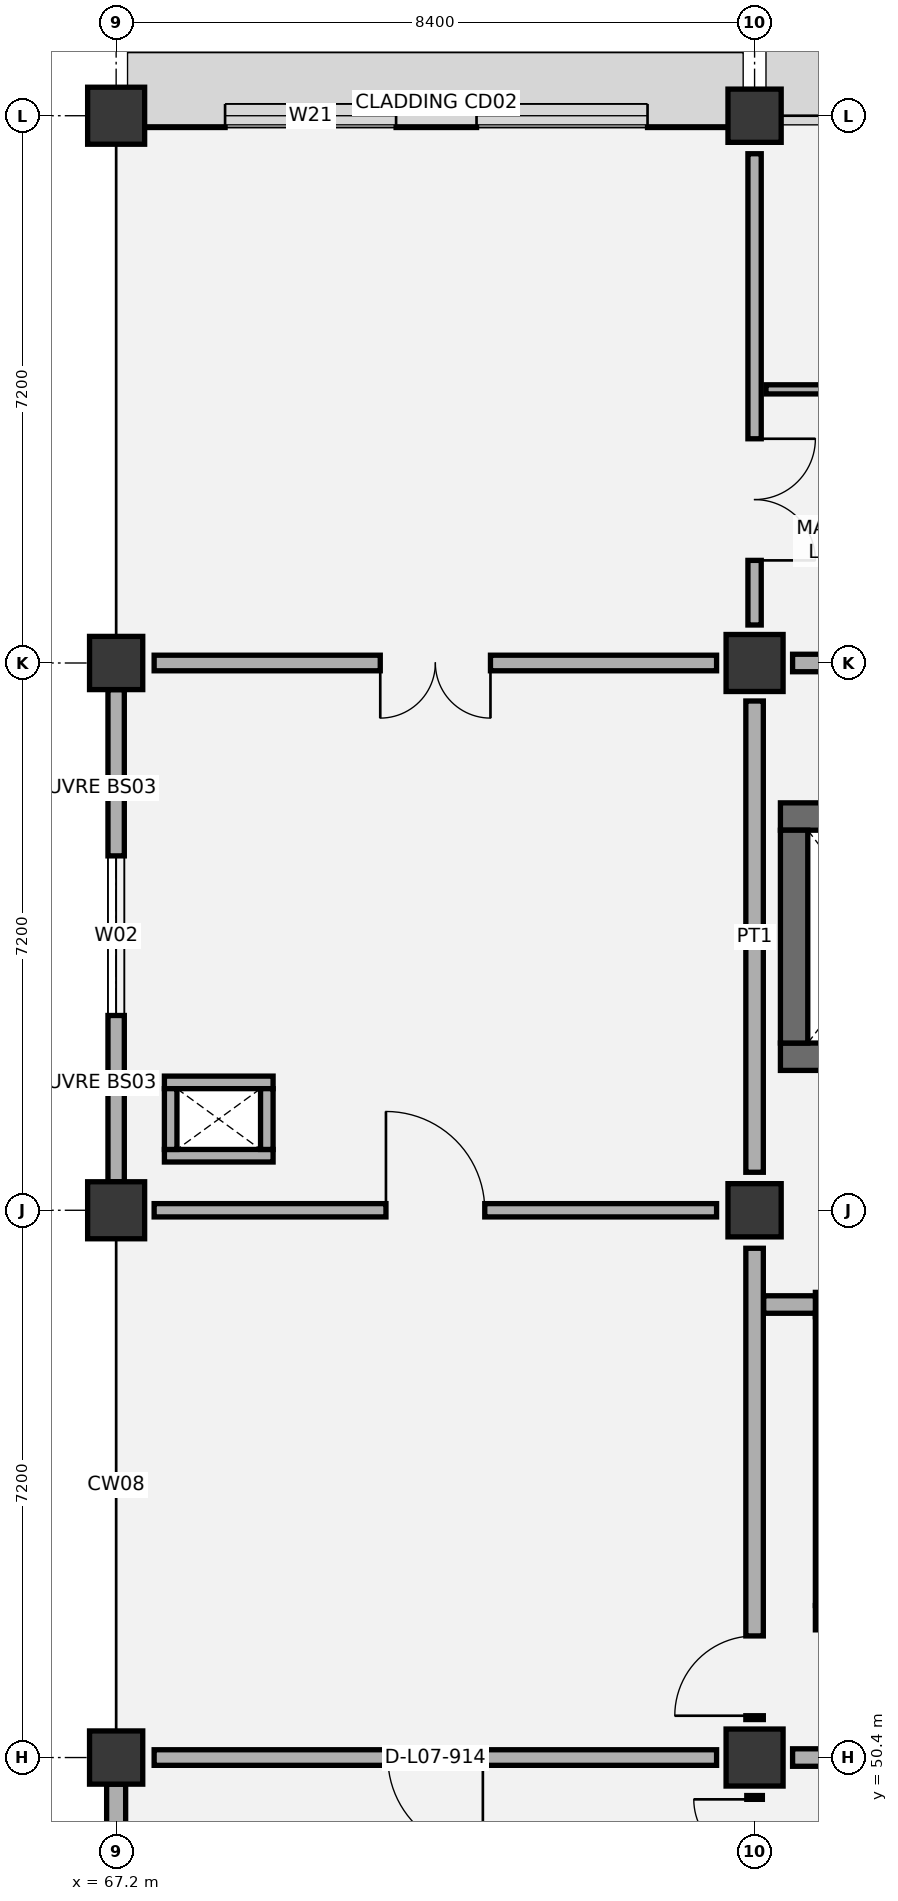
"""IFC4 building model, lengths in metres.
Left out: names, types, materials, properties, quantities, classifications, styles, units other than length and angle.
Written with IfcOpenShell. Run it as: python <this file> out.ifc"""

import sys

from ifc_helpers import new_model, si_unit, direction, frame, frame_2d, origin, origin_2d, place, context, subcontext, project, spatial, rectangle, extrude, element, fill, save


model = new_model("IFC4")
c1 = context("Model", 3, precision=1e-05, world=origin(), true_north=direction((0.0, 1.0)))
c2 = subcontext(c1, "Body", "Model", "MODEL_VIEW")
j1 = project(units=[si_unit("LENGTHUNIT", "METRE"), si_unit("PLANEANGLEUNIT", "RADIAN")], contexts=[c1])
p1 = place(None, origin())
s1 = spatial("IfcSite", under=j1, at=p1, CompositionType="ELEMENT")
p2 = place(p1, origin())
s2 = spatial("IfcBuilding", under=s1, at=p2, CompositionType="ELEMENT")
p3 = place(p2, frame((0.0, 0.0, 35.4)))
s3 = spatial("IfcBuildingStorey", under=s2, at=p3, CompositionType="ELEMENT", Elevation=35.4)
p4 = place(p3, frame((67.2, 50.4, 0.0), z_axis=(0.0, 0.0, 1.0), x_axis=(1.0, 0.0, 0.0)))
e1 = element("IfcColumn", 1, at=p4, inside=s3, PredefinedType="COLUMN", context=c2, shape_type="SweptSolid", body=[
    extrude(rectangle(XDim=0.7, YDim=0.7, at=origin_2d()), origin(), (0.0, 0.0, 1.0), 4.2),
])
p5 = place(p3, frame((67.2, 57.6, 0.0), z_axis=(0.0, 0.0, 1.0), x_axis=(1.0, 0.0, 0.0)))
e2 = element("IfcColumn", 2, at=p5, inside=s3, PredefinedType="COLUMN", context=c2, shape_type="SweptSolid", body=[
    extrude(rectangle(XDim=0.75, YDim=0.75, at=origin_2d()), origin(), (0.0, 0.0, 1.0), 4.2),
])
p6 = place(p3, frame((67.2, 64.8, 0.0), z_axis=(0.0, 0.0, 1.0), x_axis=(1.0, 0.0, 0.0)))
e3 = element("IfcColumn", 3, at=p6, inside=s3, PredefinedType="COLUMN", context=c2, shape_type="SweptSolid", body=[
    extrude(rectangle(XDim=0.7, YDim=0.7, at=origin_2d()), origin(), (0.0, 0.0, 1.0), 4.2),
])
for number, where, z_axis, x_axis in (
    (4, (67.2, 72.0, 0.0), (0.0, 0.0, 1.0), (1.0, 0.0, 0.0)),
    (5, (75.6, 50.4, 0.0), (0.0, 0.0, 1.0), (1.0, 0.0, 0.0)),
):
    element("IfcColumn", number, at=place(p3, frame(where, z_axis=z_axis, x_axis=x_axis)), inside=s3, PredefinedType="COLUMN", context=c2, shape_type="SweptSolid", body=[
        extrude(rectangle(XDim=0.75, YDim=0.75, at=origin_2d()), origin(), (0.0, 0.0, 1.0), 4.2),
    ])
p7 = place(p3, frame((75.6, 57.6, 0.0), z_axis=(0.0, 0.0, 1.0), x_axis=(1.0, 0.0, 0.0)))
e6 = element("IfcColumn", 6, at=p7, inside=s3, PredefinedType="COLUMN", context=c2, shape_type="SweptSolid", body=[
    extrude(rectangle(XDim=0.7, YDim=0.7, at=origin_2d()), origin(), (0.0, 0.0, 1.0), 4.2),
])
p8 = place(p3, frame((75.6, 64.8, 0.0), z_axis=(0.0, 0.0, 1.0), x_axis=(1.0, 0.0, 0.0)))
e7 = element("IfcColumn", 7, at=p8, inside=s3, PredefinedType="COLUMN", context=c2, shape_type="SweptSolid", body=[
    extrude(rectangle(XDim=0.75, YDim=0.75, at=origin_2d()), origin(), (0.0, 0.0, 1.0), 4.2),
])
p9 = place(p3, frame((75.6, 72.0, 0.0), z_axis=(0.0, 0.0, 1.0), x_axis=(1.0, 0.0, 0.0)))
e8 = element("IfcColumn", 8, at=p9, inside=s3, PredefinedType="COLUMN", context=c2, shape_type="SweptSolid", body=[
    extrude(rectangle(XDim=0.7, YDim=0.7, at=origin_2d()), origin(), (0.0, 0.0, 1.0), 4.2),
])
p10 = place(p3, frame((76.4, 52.24, 0.0), z_axis=(0.0, 0.0, 1.0), x_axis=(1.0, 0.0, 0.0)))
e9 = element("IfcWall", 9, at=p10, inside=s3, PredefinedType="SHEAR", context=c2, shape_type="SweptSolid", body=[
    extrude(rectangle(XDim=7.48, YDim=0.32, at=frame_2d((3.74, 0.0))), origin(), (0.0, 0.0, 1.0), 3.92),
])
p11 = place(p10, frame((0.45, 0.0, 0.0)))
e10 = element("IfcOpeningElement", 10, at=p11, cuts=e9, PredefinedType="OPENING", context=c2, shape_type="SweptSolid", body=[
    extrude(rectangle(XDim=1.05, YDim=2.15, at=frame_2d((0.525, 1.075))), frame((0.0, 0.17, 0.0), z_axis=(0.0, -1.0, 0.0), x_axis=(1.0, 0.0, 0.0)), (0.0, 0.0, 1.0), 0.34),
])
p12 = place(p3, frame((76.4, 56.36, 0.0), z_axis=(0.0, 0.0, 1.0), x_axis=(1.0, 0.0, 0.0)))
e11 = element("IfcWall", 11, at=p12, inside=s3, PredefinedType="SHEAR", context=c2, shape_type="SweptSolid", body=[
    extrude(rectangle(XDim=7.48, YDim=0.32, at=frame_2d((3.74, 0.0))), origin(), (0.0, 0.0, 1.0), 3.92),
])
p13 = place(p3, frame((76.56, 52.4, 0.0), z_axis=(0.0, 0.0, 1.0), x_axis=(0.0, 1.0, 0.0)))
e12 = element("IfcWall", 12, at=p13, inside=s3, PredefinedType="SHEAR", context=c2, shape_type="SweptSolid", body=[
    extrude(rectangle(XDim=3.8, YDim=0.32, at=frame_2d((1.9, 0.0))), origin(), (0.0, 0.0, 1.0), 3.92),
])
p14 = place(p3, frame((75.94, 62.78, 0.0), z_axis=(0.0, 0.0, 1.0), x_axis=(1.0, 0.0, 0.0)))
e13 = element("IfcWall", 13, at=p14, inside=s3, PredefinedType="SHEAR", context=c2, shape_type="SweptSolid", body=[
    extrude(rectangle(XDim=2.87, YDim=0.36, at=frame_2d((1.435, 0.0))), origin(), (0.0, 0.0, 1.0), 3.92),
])
p15 = place(p3, frame((75.94, 59.62, 0.0), z_axis=(0.0, 0.0, 1.0), x_axis=(1.0, 0.0, 0.0)))
e14 = element("IfcWall", 14, at=p15, inside=s3, PredefinedType="SHEAR", context=c2, shape_type="SweptSolid", body=[
    extrude(rectangle(XDim=2.87, YDim=0.36, at=frame_2d((1.435, 0.0))), origin(), (0.0, 0.0, 1.0), 3.92),
])
p16 = place(p15, frame((0.76, 0.0, 0.0)))
e15 = element("IfcOpeningElement", 15, at=p16, cuts=e14, PredefinedType="OPENING", context=c2, shape_type="SweptSolid", body=[
    extrude(rectangle(XDim=1.35, YDim=2.2, at=frame_2d((0.675, 1.1))), frame((0.0, 0.19, 0.0), z_axis=(0.0, -1.0, 0.0), x_axis=(1.0, 0.0, 0.0)), (0.0, 0.0, 1.0), 0.38),
])
p17 = place(p3, frame((76.12, 59.8, 0.0), z_axis=(0.0, 0.0, 1.0), x_axis=(0.0, 1.0, 0.0)))
e16 = element("IfcWall", 16, at=p17, inside=s3, PredefinedType="SHEAR", context=c2, shape_type="SweptSolid", body=[
    extrude(rectangle(XDim=2.8, YDim=0.36, at=frame_2d((1.4, 0.0))), origin(), (0.0, 0.0, 1.0), 3.92),
])
p18 = place(p3, frame((67.2, 43.575, 0.0), z_axis=(0.0, 0.0, 1.0), x_axis=(0.0, 1.0, 0.0)))
e17 = element("IfcWall", 17, at=p18, inside=s3, PredefinedType="SOLIDWALL", context=c2, shape_type="SweptSolid", body=[
    extrude(rectangle(XDim=6.475, YDim=0.25, at=frame_2d((3.238, 0.0))), origin(), (0.0, 0.0, 1.0), 3.365),
])
p19 = place(p18, frame((0.858, 0.0, 0.9)))
e18 = element("IfcOpeningElement", 18, at=p19, cuts=e17, PredefinedType="OPENING", context=c2, shape_type="SweptSolid", body=[
    extrude(rectangle(XDim=1.95, YDim=1.95, at=frame_2d((0.975, 0.975))), frame((0.0, 0.135, 0.0), z_axis=(0.0, -1.0, 0.0), x_axis=(1.0, 0.0, 0.0)), (0.0, 0.0, 1.0), 0.27),
])
p20 = place(p18, frame((3.667, 0.0, 0.9)))
e19 = element("IfcOpeningElement", 19, at=p20, cuts=e17, PredefinedType="OPENING", context=c2, shape_type="SweptSolid", body=[
    extrude(rectangle(XDim=1.95, YDim=1.95, at=frame_2d((0.975, 0.975))), frame((0.0, 0.135, 0.0), z_axis=(0.0, -1.0, 0.0), x_axis=(1.0, 0.0, 0.0)), (0.0, 0.0, 1.0), 0.27),
])
p21 = place(p3, frame((67.2, 57.975, 0.0), z_axis=(0.0, 0.0, 1.0), x_axis=(0.0, 1.0, 0.0)))
e20 = element("IfcWall", 20, at=p21, inside=s3, PredefinedType="SOLIDWALL", context=c2, shape_type="SweptSolid", body=[
    extrude(rectangle(XDim=6.475, YDim=0.215, at=frame_2d((3.237, 0.0))), origin(), (0.0, 0.0, 1.0), 3.365),
])
p22 = place(p21, frame((2.188, 0.0, 0.9)))
e21 = element("IfcOpeningElement", 21, at=p22, cuts=e20, PredefinedType="OPENING", context=c2, shape_type="SweptSolid", body=[
    extrude(rectangle(XDim=2.1, YDim=1.8, at=frame_2d((1.05, 0.9))), frame((0.0, 0.117, 0.0), z_axis=(0.0, -1.0, 0.0), x_axis=(1.0, 0.0, 0.0)), (0.0, 0.0, 1.0), 0.235),
])
p23 = place(p3, frame((67.575, 72.0, 0.0), z_axis=(0.0, 0.0, 1.0), x_axis=(1.0, 0.0, 0.0)))
e22 = element("IfcWall", 22, at=p23, inside=s3, PredefinedType="SOLIDWALL", context=c2, shape_type="SweptSolid", body=[
    extrude(rectangle(XDim=7.675, YDim=0.31, at=frame_2d((3.837, 0.0))), origin(), (0.0, 0.0, 1.0), 3.365),
])
p24 = place(p23, frame((1.058, 0.0, 0.9)))
e23 = element("IfcOpeningElement", 23, at=p24, cuts=e22, PredefinedType="OPENING", context=c2, shape_type="SweptSolid", body=[
    extrude(rectangle(XDim=2.25, YDim=1.95, at=frame_2d((1.125, 0.975))), frame((0.0, 0.165, 0.0), z_axis=(0.0, -1.0, 0.0), x_axis=(1.0, 0.0, 0.0)), (0.0, 0.0, 1.0), 0.33),
])
p25 = place(p23, frame((4.367, 0.0, 0.9)))
e24 = element("IfcOpeningElement", 24, at=p25, cuts=e22, PredefinedType="OPENING", context=c2, shape_type="SweptSolid", body=[
    extrude(rectangle(XDim=2.25, YDim=1.95, at=frame_2d((1.125, 0.975))), frame((0.0, 0.165, 0.0), z_axis=(0.0, -1.0, 0.0), x_axis=(1.0, 0.0, 0.0)), (0.0, 0.0, 1.0), 0.33),
])
for number, where, z_axis, x_axis in (
    (25, (67.835, 58.317, 0.0), (0.0, 0.0, 1.0), (1.0, 0.0, 0.0)),
    (26, (67.835, 59.282, 0.0), (0.0, 0.0, 1.0), (1.0, 0.0, 0.0)),
):
    element("IfcWall", number, at=place(p3, frame(where, z_axis=z_axis, x_axis=x_axis)), inside=s3, PredefinedType="PARTITIONING", context=c2, shape_type="SweptSolid", body=[
        extrude(rectangle(XDim=1.43, YDim=0.165, at=frame_2d((0.715, 0.0))), origin(), (0.0, 0.0, 1.0), 3.92),
    ])
for number, where, z_axis, x_axis in (
    (27, (67.917, 58.4, 0.0), (0.0, 0.0, 1.0), (0.0, 1.0, 0.0)),
    (28, (69.183, 58.4, 0.0), (0.0, 0.0, 1.0), (0.0, 1.0, 0.0)),
):
    element("IfcWall", number, at=place(p3, frame(where, z_axis=z_axis, x_axis=x_axis)), inside=s3, PredefinedType="PARTITIONING", context=c2, shape_type="SweptSolid", body=[
        extrude(rectangle(XDim=0.8, YDim=0.165, at=frame_2d((0.4, 0.0))), origin(), (0.0, 0.0, 1.0), 3.92),
    ])
p26 = place(p3, frame((75.75, 68.4, 0.0), z_axis=(0.0, 0.0, 1.0), x_axis=(1.0, 0.0, 0.0)))
e29 = element("IfcWall", 29, at=p26, inside=s3, PredefinedType="PARTITIONING", context=c2, shape_type="SweptSolid", body=[
    extrude(rectangle(XDim=8.1, YDim=0.12, at=frame_2d((4.05, 0.0))), origin(), (0.0, 0.0, 1.0), 3.92),
])
p27 = place(p26, frame((3.55, 0.0, 0.0)))
e30 = element("IfcOpeningElement", 30, at=p27, cuts=e29, PredefinedType="OPENING", context=c2, shape_type="SweptSolid", body=[
    extrude(rectangle(XDim=1.6, YDim=2.2, at=frame_2d((0.8, 1.1))), frame((0.0, 0.07, 0.0), z_axis=(0.0, -1.0, 0.0), x_axis=(1.0, 0.0, 0.0)), (0.0, 0.0, 1.0), 0.14),
])
p28 = place(p3, frame((75.6, 43.7, 0.0), z_axis=(0.0, 0.0, 1.0), x_axis=(0.0, 1.0, 0.0)))
e31 = element("IfcWall", 31, at=p28, inside=s3, PredefinedType="PARTITIONING", context=c2, shape_type="SweptSolid", body=[
    extrude(rectangle(XDim=6.2, YDim=0.205, at=frame_2d((3.1, 0.0))), origin(), (0.0, 0.0, 1.0), 3.415),
])
p29 = place(p28, frame((4.55, 0.0, 0.0)))
e32 = element("IfcOpeningElement", 32, at=p29, cuts=e31, PredefinedType="OPENING", context=c2, shape_type="SweptSolid", body=[
    extrude(rectangle(XDim=1.6, YDim=2.2, at=frame_2d((0.8, 1.1))), frame((0.0, 0.113, 0.0), z_axis=(0.0, -1.0, 0.0), x_axis=(1.0, 0.0, 0.0)), (0.0, 0.0, 1.0), 0.225),
])
p30 = place(p3, frame((67.7, 50.4, 0.0), z_axis=(0.0, 0.0, 1.0), x_axis=(1.0, 0.0, 0.0)))
e33 = element("IfcWall", 33, at=p30, inside=s3, PredefinedType="PARTITIONING", context=c2, shape_type="SweptSolid", body=[
    extrude(rectangle(XDim=7.4, YDim=0.205, at=frame_2d((3.7, 0.0))), origin(), (0.0, 0.0, 1.0), 3.265),
])
p31 = place(p30, frame((3.075, 0.0, 0.0)))
e34 = element("IfcOpeningElement", 34, at=p31, cuts=e33, PredefinedType="OPENING", context=c2, shape_type="SweptSolid", body=[
    extrude(rectangle(XDim=1.25, YDim=2.1, at=frame_2d((0.625, 1.05))), frame((0.0, 0.113, 0.0), z_axis=(0.0, -1.0, 0.0), x_axis=(1.0, 0.0, 0.0)), (0.0, 0.0, 1.0), 0.225),
])
p32 = place(p3, frame((75.6, 50.9, 0.0), z_axis=(0.0, 0.0, 1.0), x_axis=(0.0, 1.0, 0.0)))
e35 = element("IfcWall", 35, at=p32, inside=s3, PredefinedType="PARTITIONING", context=c2, shape_type="SweptSolid", body=[
    extrude(rectangle(XDim=6.2, YDim=0.23, at=frame_2d((3.1, 0.0))), origin(), (0.0, 0.0, 1.0), 3.315),
])
p33 = place(p32, frame((0.05, 0.0, 0.0)))
e36 = element("IfcOpeningElement", 36, at=p33, cuts=e35, PredefinedType="OPENING", context=c2, shape_type="SweptSolid", body=[
    extrude(rectangle(XDim=1.05, YDim=2.15, at=frame_2d((0.525, 1.075))), frame((0.0, 0.125, 0.0), z_axis=(0.0, -1.0, 0.0), x_axis=(1.0, 0.0, 0.0)), (0.0, 0.0, 1.0), 0.25),
])
p34 = place(p3, frame((67.7, 57.6, 0.0), z_axis=(0.0, 0.0, 1.0), x_axis=(1.0, 0.0, 0.0)))
e37 = element("IfcWall", 37, at=p34, inside=s3, PredefinedType="PARTITIONING", context=c2, shape_type="SweptSolid", body=[
    extrude(rectangle(XDim=7.4, YDim=0.175, at=frame_2d((3.7, 0.0))), origin(), (0.0, 0.0, 1.0), 3.265),
])
p35 = place(p34, frame((3.05, 0.0, 0.0)))
e38 = element("IfcOpeningElement", 38, at=p35, cuts=e37, PredefinedType="OPENING", context=c2, shape_type="SweptSolid", body=[
    extrude(rectangle(XDim=1.3, YDim=2.15, at=frame_2d((0.65, 1.075))), frame((0.0, 0.097, 0.0), z_axis=(0.0, -1.0, 0.0), x_axis=(1.0, 0.0, 0.0)), (0.0, 0.0, 1.0), 0.195),
])
p36 = place(p3, frame((75.6, 58.1, 0.0), z_axis=(0.0, 0.0, 1.0), x_axis=(0.0, 1.0, 0.0)))
e39 = element("IfcWall", 39, at=p36, inside=s3, PredefinedType="PARTITIONING", context=c2, shape_type="SweptSolid", body=[
    extrude(rectangle(XDim=6.2, YDim=0.23, at=frame_2d((3.1, 0.0))), origin(), (0.0, 0.0, 1.0), 3.515),
])
p37 = place(p3, frame((67.7, 64.8, 0.0), z_axis=(0.0, 0.0, 1.0), x_axis=(1.0, 0.0, 0.0)))
e40 = element("IfcWall", 40, at=p37, inside=s3, PredefinedType="PARTITIONING", context=c2, shape_type="SweptSolid", body=[
    extrude(rectangle(XDim=7.4, YDim=0.205, at=frame_2d((3.7, 0.0))), origin(), (0.0, 0.0, 1.0), 3.265),
])
p38 = place(p37, frame((2.975, 0.0, 0.0)))
e41 = element("IfcOpeningElement", 41, at=p38, cuts=e40, PredefinedType="OPENING", context=c2, shape_type="SweptSolid", body=[
    extrude(rectangle(XDim=1.45, YDim=2.2, at=frame_2d((0.725, 1.1))), frame((0.0, 0.113, 0.0), z_axis=(0.0, -1.0, 0.0), x_axis=(1.0, 0.0, 0.0)), (0.0, 0.0, 1.0), 0.225),
])
p39 = place(p3, frame((75.6, 65.3, 0.0), z_axis=(0.0, 0.0, 1.0), x_axis=(0.0, 1.0, 0.0)))
e42 = element("IfcWall", 42, at=p39, inside=s3, PredefinedType="PARTITIONING", context=c2, shape_type="SweptSolid", body=[
    extrude(rectangle(XDim=6.2, YDim=0.175, at=frame_2d((3.1, 0.0))), origin(), (0.0, 0.0, 1.0), 3.315),
])
p40 = place(p39, frame((0.85, 0.0, 0.0)))
e43 = element("IfcOpeningElement", 43, at=p40, cuts=e42, PredefinedType="OPENING", context=c2, shape_type="SweptSolid", body=[
    extrude(rectangle(XDim=1.6, YDim=2.2, at=frame_2d((0.8, 1.1))), frame((0.0, 0.097, 0.0), z_axis=(0.0, -1.0, 0.0), x_axis=(1.0, 0.0, 0.0)), (0.0, 0.0, 1.0), 0.195),
])
p41 = place(p3, frame((76.1, 50.4, 0.0), z_axis=(0.0, 0.0, 1.0), x_axis=(1.0, 0.0, 0.0)))
e44 = element("IfcWall", 44, at=p41, inside=s3, PredefinedType="PARTITIONING", context=c2, shape_type="SweptSolid", body=[
    extrude(rectangle(XDim=7.4, YDim=0.23, at=frame_2d((3.7, 0.0))), origin(), (0.0, 0.0, 1.0), 3.565),
])
p42 = place(p41, frame((2.95, 0.0, 0.0)))
e45 = element("IfcOpeningElement", 45, at=p42, cuts=e44, PredefinedType="OPENING", context=c2, shape_type="SweptSolid", body=[
    extrude(rectangle(XDim=1.5, YDim=2.15, at=frame_2d((0.75, 1.075))), frame((0.0, 0.125, 0.0), z_axis=(0.0, -1.0, 0.0), x_axis=(1.0, 0.0, 0.0)), (0.0, 0.0, 1.0), 0.25),
])
p43 = place(p3, frame((75.72, 56.36, 0.0), z_axis=(0.0, 0.0, 1.0), x_axis=(1.0, 0.0, 0.0)))
e46 = element("IfcWall", 46, at=p43, inside=s3, PredefinedType="PARTITIONING", context=c2, shape_type="SweptSolid", body=[
    extrude(rectangle(XDim=0.68, YDim=0.23, at=frame_2d((0.34, 0.0))), origin(), (0.0, 0.0, 1.0), 3.92),
])
p44 = place(p3, frame((76.1, 64.8, 0.0), z_axis=(0.0, 0.0, 1.0), x_axis=(1.0, 0.0, 0.0)))
e47 = element("IfcWall", 47, at=p44, inside=s3, PredefinedType="PARTITIONING", context=c2, shape_type="SweptSolid", body=[
    extrude(rectangle(XDim=7.4, YDim=0.23, at=frame_2d((3.7, 0.0))), origin(), (0.0, 0.0, 1.0), 3.565),
])
p45 = place(p22, origin())
e48 = element("IfcWindow", 48, at=p45, inside=s3, PartitioningType="SINGLE_PANEL", PredefinedType="WINDOW", context=c2, shape_type="SweptSolid", body=[
    extrude(rectangle(XDim=2.1, YDim=1.8, at=frame_2d((1.05, 0.9))), frame((0.0, 0.03, 0.0), z_axis=(0.0, -1.0, 0.0), x_axis=(1.0, 0.0, 0.0)), (0.0, 0.0, 1.0), 0.06),
])
fill(e21, e48)
p46 = place(p24, origin())
e49 = element("IfcWindow", 49, at=p46, inside=s3, PartitioningType="SINGLE_PANEL", PredefinedType="WINDOW", context=c2, shape_type="SweptSolid", body=[
    extrude(rectangle(XDim=2.25, YDim=1.95, at=frame_2d((1.125, 0.975))), frame((0.0, 0.03, 0.0), z_axis=(0.0, -1.0, 0.0), x_axis=(1.0, 0.0, 0.0)), (0.0, 0.0, 1.0), 0.06),
])
fill(e23, e49)
p47 = place(p25, origin())
e50 = element("IfcWindow", 50, at=p47, inside=s3, PartitioningType="SINGLE_PANEL", PredefinedType="WINDOW", context=c2, shape_type="SweptSolid", body=[
    extrude(rectangle(XDim=2.25, YDim=1.95, at=frame_2d((1.125, 0.975))), frame((0.0, 0.03, 0.0), z_axis=(0.0, -1.0, 0.0), x_axis=(1.0, 0.0, 0.0)), (0.0, 0.0, 1.0), 0.06),
])
fill(e24, e50)
p48 = place(p29, origin())
e51 = element("IfcDoor", 51, at=p48, inside=s3, OperationType="DOUBLE_DOOR_SINGLE_SWING", PredefinedType="DOOR", context=c2, shape_type="SweptSolid", body=[
    extrude(rectangle(XDim=1.6, YDim=2.2, at=frame_2d((0.8, 1.1))), frame((0.0, 0.025, 0.0), z_axis=(0.0, -1.0, 0.0), x_axis=(1.0, 0.0, 0.0)), (0.0, 0.0, 1.0), 0.05),
])
fill(e32, e51)
p49 = place(p31, frame((1.25, 0.0, 0.0), z_axis=(0.0, 0.0, 1.0), x_axis=(-1.0, 0.0, 0.0)))
e52 = element("IfcDoor", 52, at=p49, inside=s3, OperationType="SINGLE_SWING_LEFT", PredefinedType="DOOR", context=c2, shape_type="SweptSolid", body=[
    extrude(rectangle(XDim=1.25, YDim=2.1, at=frame_2d((0.625, 1.05))), frame((0.0, 0.025, 0.0), z_axis=(0.0, -1.0, 0.0), x_axis=(1.0, 0.0, 0.0)), (0.0, 0.0, 1.0), 0.05),
])
fill(e34, e52)
p50 = place(p33, origin())
e53 = element("IfcDoor", 53, at=p50, inside=s3, OperationType="SINGLE_SWING_LEFT", PredefinedType="DOOR", context=c2, shape_type="SweptSolid", body=[
    extrude(rectangle(XDim=1.05, YDim=2.15, at=frame_2d((0.525, 1.075))), frame((0.0, 0.025, 0.0), z_axis=(0.0, -1.0, 0.0), x_axis=(1.0, 0.0, 0.0)), (0.0, 0.0, 1.0), 0.05),
])
fill(e36, e53)
p51 = place(p35, origin())
e54 = element("IfcDoor", 54, at=p51, inside=s3, OperationType="SINGLE_SWING_LEFT", PredefinedType="DOOR", context=c2, shape_type="SweptSolid", body=[
    extrude(rectangle(XDim=1.3, YDim=2.15, at=frame_2d((0.65, 1.075))), frame((0.0, 0.025, 0.0), z_axis=(0.0, -1.0, 0.0), x_axis=(1.0, 0.0, 0.0)), (0.0, 0.0, 1.0), 0.05),
])
fill(e38, e54)
p52 = place(p38, frame((1.45, 0.0, 0.0), z_axis=(0.0, 0.0, 1.0), x_axis=(-1.0, 0.0, 0.0)))
e55 = element("IfcDoor", 55, at=p52, inside=s3, OperationType="DOUBLE_DOOR_SINGLE_SWING", PredefinedType="DOOR", context=c2, shape_type="SweptSolid", body=[
    extrude(rectangle(XDim=1.45, YDim=2.2, at=frame_2d((0.725, 1.1))), frame((0.0, 0.025, 0.0), z_axis=(0.0, -1.0, 0.0), x_axis=(1.0, 0.0, 0.0)), (0.0, 0.0, 1.0), 0.05),
])
fill(e41, e55)
p53 = place(p40, frame((1.6, 0.0, 0.0), z_axis=(0.0, 0.0, 1.0), x_axis=(-1.0, 0.0, 0.0)))
e56 = element("IfcDoor", 56, at=p53, inside=s3, OperationType="DOUBLE_DOOR_SINGLE_SWING", PredefinedType="DOOR", context=c2, shape_type="SweptSolid", body=[
    extrude(rectangle(XDim=1.6, YDim=2.2, at=frame_2d((0.8, 1.1))), frame((0.0, 0.025, 0.0), z_axis=(0.0, -1.0, 0.0), x_axis=(1.0, 0.0, 0.0)), (0.0, 0.0, 1.0), 0.05),
])
fill(e43, e56)
save(model, sys.argv[1])
